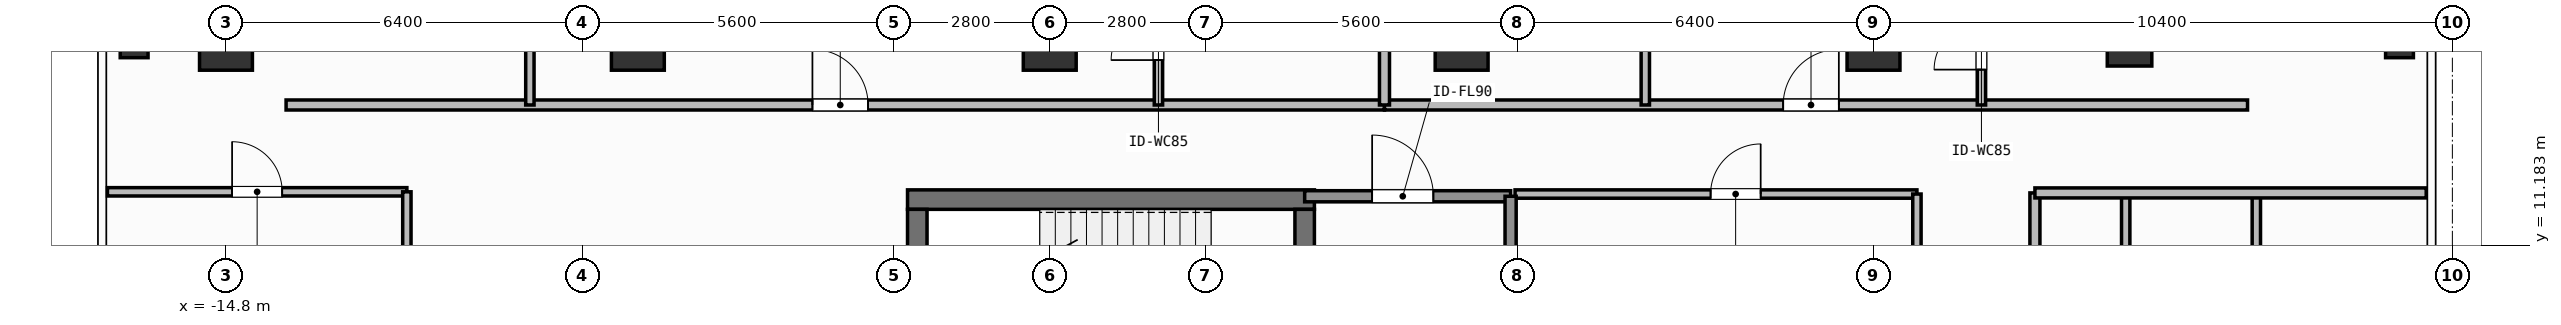
"""IFC4 building model, lengths in metres.
Left out: names, types, materials, properties, quantities, classifications, styles, units other than length and angle.
Written with IfcOpenShell. Run it as: python <this file> out.ifc"""

import sys

from ifc_helpers import new_model, si_unit, direction, frame, frame_2d, origin, origin_2d, place, context, subcontext, project, spatial, rectangle, hollow_rectangle, extrude, element, fill, save


model = new_model("IFC4")
c1 = context("Model", 3, precision=1e-05, world=origin(), true_north=direction((0.0, 1.0)))
c2 = subcontext(c1, "Body", "Model", "MODEL_VIEW")
j1 = project(units=[si_unit("LENGTHUNIT", "METRE"), si_unit("PLANEANGLEUNIT", "RADIAN")], contexts=[c1])
p1 = place(None, origin())
s1 = spatial("IfcSite", under=j1, at=p1, CompositionType="ELEMENT")
p2 = place(p1, origin())
s2 = spatial("IfcBuilding", under=s1, at=p2, CompositionType="ELEMENT")
p3 = place(p2, frame((0.0, 0.0, 278.1)))
s3 = spatial("IfcBuildingStorey", under=s2, at=p3, CompositionType="ELEMENT", Elevation=278.1)
p4 = place(p3, frame((-2.555, 12.0, 0.0), z_axis=(0.0, 0.0, 1.0), x_axis=(1.0, 0.0, 0.0)))
e1 = element("IfcWall", 1, at=p4, inside=s3, PredefinedType="SHEAR", context=c2, shape_type="SweptSolid", body=[
    extrude(rectangle(XDim=7.31, YDim=0.35, at=frame_2d((3.655, 0.0))), origin(), (0.0, 0.0, 1.0), 3.9),
])
p5 = place(p3, frame((-2.38, 8.9, 0.0), z_axis=(0.0, 0.0, 1.0), x_axis=(0.0, 1.0, 0.0)))
e2 = element("IfcWall", 2, at=p5, inside=s3, PredefinedType="SHEAR", context=c2, shape_type="SweptSolid", body=[
    extrude(rectangle(XDim=2.925, YDim=0.35, at=frame_2d((1.462, 0.0))), origin(), (0.0, 0.0, 1.0), 3.9),
])
p6 = place(p3, frame((4.58, 11.825, 0.0), z_axis=(0.0, 0.0, 1.0), x_axis=(0.0, -1.0, 0.0)))
e3 = element("IfcWall", 3, at=p6, inside=s3, PredefinedType="SHEAR", context=c2, shape_type="SweptSolid", body=[
    extrude(rectangle(XDim=2.925, YDim=0.35, at=frame_2d((1.462, 0.0))), origin(), (0.0, 0.0, 1.0), 3.9),
])
p7 = place(p6, frame((0.913, 0.0, 0.0)))
e4 = element("IfcOpeningElement", 4, at=p7, cuts=e3, PredefinedType="OPENING", context=c2, shape_type="SweptSolid", body=[
    extrude(rectangle(XDim=1.1, YDim=2.15, at=frame_2d((0.55, 1.075))), frame((0.0, 0.185, 0.0), z_axis=(0.0, -1.0, 0.0), x_axis=(1.0, 0.0, 0.0)), (0.0, 0.0, 1.0), 0.37),
])
for number, where, z_axis, x_axis in (
    (5, (-14.8, 14.8, 0.0), (0.0, 0.0, 1.0), (1.0, 0.0, 0.0)),
    (6, (-7.4, 14.8, 0.0), (0.0, 0.0, 1.0), (1.0, 0.0, 0.0)),
    (7, (0.0, 14.8, 0.0), (0.0, 0.0, 1.0), (1.0, 0.0, 0.0)),
    (8, (7.4, 14.8, 0.0), (0.0, 0.0, 1.0), (1.0, 0.0, 0.0)),
    (9, (14.8, 14.8, 0.0), (0.0, 0.0, 1.0), (1.0, 0.0, 0.0)),
):
    element("IfcColumn", number, at=place(p3, frame(where, z_axis=z_axis, x_axis=x_axis)), inside=s3, PredefinedType="COLUMN", context=c2, shape_type="SweptSolid", body=[
        extrude(rectangle(XDim=0.95, YDim=0.95, at=origin_2d()), origin(), (0.0, 0.0, 1.0), 3.9),
    ])
p8 = place(p3, frame((19.4, 14.8, 0.0), z_axis=(0.0, 0.0, 1.0), x_axis=(1.0, 0.0, 0.0)))
e10 = element("IfcColumn", 10, at=p8, inside=s3, PredefinedType="COLUMN", context=c2, shape_type="SweptSolid", body=[
    extrude(hollow_rectangle(XDim=0.8, YDim=0.8, WallThickness=0.036, at=origin_2d()), origin(), (0.0, 0.0, 1.0), 3.9),
])
for number, where, z_axis, x_axis in (
    (11, (-16.45, 14.8, 0.0), (0.0, 0.0, 1.0), (1.0, 0.0, 0.0)),
    (12, (24.25, 14.8, 0.0), (0.0, 0.0, 1.0), (1.0, 0.0, 0.0)),
):
    element("IfcColumn", number, at=place(p3, frame(where, z_axis=z_axis, x_axis=x_axis)), inside=s3, PredefinedType="COLUMN", context=c2, shape_type="SweptSolid", body=[
        extrude(hollow_rectangle(XDim=0.5, YDim=0.5, WallThickness=0.025, at=origin_2d()), origin(), (0.0, 0.0, 1.0), 3.9),
    ])
p9 = place(p3, frame((4.58, 12.06, 0.0), z_axis=(0.0, 0.0, 1.0), x_axis=(1.0, 0.0, 0.0)))
e13 = element("IfcWall", 13, at=p9, inside=s3, PredefinedType="SOLIDWALL", context=c2, shape_type="SweptSolid", body=[
    extrude(rectangle(XDim=3.7, YDim=0.2, at=frame_2d((1.85, 0.0))), origin(), (0.0, 0.0, 1.0), 3.68),
])
p10 = place(p9, frame((1.212, 0.0, 0.0)))
e14 = element("IfcOpeningElement", 14, at=p10, cuts=e13, PredefinedType="OPENING", context=c2, shape_type="SweptSolid", body=[
    extrude(rectangle(XDim=1.1, YDim=2.15, at=frame_2d((0.55, 1.075))), frame((0.0, 0.11, 0.0), z_axis=(0.0, -1.0, 0.0), x_axis=(1.0, 0.0, 0.0)), (0.0, 0.0, 1.0), 0.22),
])
p11 = place(p3, frame((8.36, 12.1, 0.0), z_axis=(0.0, 0.0, 1.0), x_axis=(1.0, 0.0, 0.0)))
e15 = element("IfcWall", 15, at=p11, inside=s3, PredefinedType="PARTITIONING", context=c2, shape_type="SweptSolid", body=[
    extrude(rectangle(XDim=7.22, YDim=0.15, at=frame_2d((3.61, 0.0))), origin(), (0.0, 0.0, 1.0), 3.68),
])
p12 = place(p11, frame((3.513, 0.0, 0.0)))
e16 = element("IfcOpeningElement", 16, at=p12, cuts=e15, PredefinedType="OPENING", context=c2, shape_type="SweptSolid", body=[
    extrude(rectangle(XDim=0.9, YDim=2.1, at=frame_2d((0.45, 1.05))), frame((0.0, 0.085, 0.0), z_axis=(0.0, -1.0, 0.0), x_axis=(1.0, 0.0, 0.0)), (0.0, 0.0, 1.0), 0.17),
])
p13 = place(p3, frame((-13.72, 13.7, 0.0), z_axis=(0.0, 0.0, 1.0), x_axis=(1.0, 0.0, 0.0)))
e17 = element("IfcWall", 17, at=p13, inside=s3, PredefinedType="PARTITIONING", context=c2, shape_type="SweptSolid", body=[
    extrude(rectangle(XDim=19.734, YDim=0.18, at=frame_2d((9.867, 0.0))), origin(), (0.0, 0.0, 1.0), 3.68),
])
p14 = place(p13, frame((9.456, 0.0, 0.0)))
e18 = element("IfcOpeningElement", 18, at=p14, cuts=e17, PredefinedType="OPENING", context=c2, shape_type="SweptSolid", body=[
    extrude(rectangle(XDim=1.0, YDim=2.2, at=frame_2d((0.5, 1.1))), frame((0.0, 0.1, 0.0), z_axis=(0.0, -1.0, 0.0), x_axis=(1.0, 0.0, 0.0)), (0.0, 0.0, 1.0), 0.2),
])
p15 = place(p3, frame((-9.34, 13.7, 0.0), z_axis=(0.0, 0.0, 1.0), x_axis=(0.0, 1.0, 0.0)))
e19 = element("IfcWall", 19, at=p15, inside=s3, PredefinedType="PARTITIONING", context=c2, shape_type="SweptSolid", body=[
    extrude(rectangle(XDim=4.11, YDim=0.15, at=frame_2d((2.055, 0.0))), origin(), (0.0, 0.0, 1.0), 3.68),
])
p16 = place(p15, frame((1.543, 0.0, 0.0)))
e20 = element("IfcOpeningElement", 20, at=p16, cuts=e19, PredefinedType="OPENING", context=c2, shape_type="SweptSolid", body=[
    extrude(rectangle(XDim=0.85, YDim=2.1, at=frame_2d((0.425, 1.05))), frame((0.0, 0.085, 0.0), z_axis=(0.0, -1.0, 0.0), x_axis=(1.0, 0.0, 0.0)), (0.0, 0.0, 1.0), 0.17),
])
p17 = place(p3, frame((1.953, 13.7, 0.0), z_axis=(0.0, 0.0, 1.0), x_axis=(0.0, 1.0, 0.0)))
e21 = element("IfcWall", 21, at=p17, inside=s3, PredefinedType="PARTITIONING", context=c2, shape_type="SweptSolid", body=[
    extrude(rectangle(XDim=2.302, YDim=0.15, at=frame_2d((1.151, 0.0))), origin(), (0.0, 0.0, 1.0), 3.68),
])
p18 = place(p17, frame((0.807, 0.0, 0.0)))
e22 = element("IfcOpeningElement", 22, at=p18, cuts=e21, PredefinedType="OPENING", context=c2, shape_type="SweptSolid", body=[
    extrude(rectangle(XDim=0.85, YDim=2.1, at=frame_2d((0.425, 1.05))), frame((0.0, 0.085, 0.0), z_axis=(0.0, -1.0, 0.0), x_axis=(1.0, 0.0, 0.0)), (0.0, 0.0, 1.0), 0.17),
])
p19 = place(p3, frame((6.014, 13.7, 0.0), z_axis=(0.0, 0.0, 1.0), x_axis=(1.0, 0.0, 0.0)))
e23 = element("IfcWall", 23, at=p19, inside=s3, PredefinedType="PARTITIONING", context=c2, shape_type="SweptSolid", body=[
    extrude(rectangle(XDim=15.506, YDim=0.18, at=frame_2d((7.753, 0.0))), origin(), (0.0, 0.0, 1.0), 3.68),
])
p20 = place(p19, frame((7.163, 0.0, 0.0)))
e24 = element("IfcOpeningElement", 24, at=p20, cuts=e23, PredefinedType="OPENING", context=c2, shape_type="SweptSolid", body=[
    extrude(rectangle(XDim=1.0, YDim=2.2, at=frame_2d((0.5, 1.1))), frame((0.0, 0.1, 0.0), z_axis=(0.0, -1.0, 0.0), x_axis=(1.0, 0.0, 0.0)), (0.0, 0.0, 1.0), 0.2),
])
p21 = place(p3, frame((10.7, 13.7, 0.0), z_axis=(0.0, 0.0, 1.0), x_axis=(0.0, 1.0, 0.0)))
e25 = element("IfcWall", 25, at=p21, inside=s3, PredefinedType="PARTITIONING", context=c2, shape_type="SweptSolid", body=[
    extrude(rectangle(XDim=3.787, YDim=0.15, at=frame_2d((1.894, 0.0))), origin(), (0.0, 0.0, 1.0), 3.68),
])
p22 = place(p21, frame((1.381, 0.0, 0.0)))
e26 = element("IfcOpeningElement", 26, at=p22, cuts=e25, PredefinedType="OPENING", context=c2, shape_type="SweptSolid", body=[
    extrude(rectangle(XDim=0.85, YDim=2.1, at=frame_2d((0.425, 1.05))), frame((0.0, 0.085, 0.0), z_axis=(0.0, -1.0, 0.0), x_axis=(1.0, 0.0, 0.0)), (0.0, 0.0, 1.0), 0.17),
])
p23 = place(p3, frame((16.739, 13.7, 0.0), z_axis=(0.0, 0.0, 1.0), x_axis=(0.0, 1.0, 0.0)))
e27 = element("IfcWall", 27, at=p23, inside=s3, PredefinedType="PARTITIONING", context=c2, shape_type="SweptSolid", body=[
    extrude(rectangle(XDim=2.121, YDim=0.15, at=frame_2d((1.061, 0.0))), origin(), (0.0, 0.0, 1.0), 3.68),
])
p24 = place(p23, frame((0.635, 0.0, 0.0)))
e28 = element("IfcOpeningElement", 28, at=p24, cuts=e27, PredefinedType="OPENING", context=c2, shape_type="SweptSolid", body=[
    extrude(rectangle(XDim=0.85, YDim=2.1, at=frame_2d((0.425, 1.05))), frame((0.0, 0.085, 0.0), z_axis=(0.0, -1.0, 0.0), x_axis=(1.0, 0.0, 0.0)), (0.0, 0.0, 1.0), 0.17),
])
p25 = place(p3, frame((-16.93, 12.14, 0.0), z_axis=(0.0, 0.0, 1.0), x_axis=(1.0, 0.0, 0.0)))
e29 = element("IfcWall", 29, at=p25, inside=s3, PredefinedType="PARTITIONING", context=c2, shape_type="SweptSolid", body=[
    extrude(rectangle(XDim=5.38, YDim=0.15, at=frame_2d((2.69, 0.0))), origin(), (0.0, 0.0, 1.0), 3.68),
])
p26 = place(p25, frame((2.24, 0.0, 0.0)))
e30 = element("IfcOpeningElement", 30, at=p26, cuts=e29, PredefinedType="OPENING", context=c2, shape_type="SweptSolid", body=[
    extrude(rectangle(XDim=0.9, YDim=2.1, at=frame_2d((0.45, 1.05))), frame((0.0, 0.085, 0.0), z_axis=(0.0, -1.0, 0.0), x_axis=(1.0, 0.0, 0.0)), (0.0, 0.0, 1.0), 0.17),
])
p27 = place(p3, frame((17.7, -12.12, 0.0), z_axis=(0.0, 0.0, 1.0), x_axis=(0.0, 1.0, 0.0)))
e31 = element("IfcWall", 31, at=p27, inside=s3, PredefinedType="PARTITIONING", context=c2, shape_type="SweptSolid", body=[
    extrude(rectangle(XDim=24.24, YDim=0.18, at=frame_2d((12.12, 0.0))), origin(), (0.0, 0.0, 1.0), 3.68),
])
p28 = place(p27, frame((11.62, 0.0, 0.0)))
e32 = element("IfcOpeningElement", 32, at=p28, cuts=e31, PredefinedType="OPENING", context=c2, shape_type="SweptSolid", body=[
    extrude(rectangle(XDim=1.0, YDim=2.2, at=frame_2d((0.5, 1.1))), frame((0.0, 0.1, 0.0), z_axis=(0.0, -1.0, 0.0), x_axis=(1.0, 0.0, 0.0)), (0.0, 0.0, 1.0), 0.2),
])
p29 = place(p3, frame((8.28, 8.725, 0.0), z_axis=(0.0, 0.0, 1.0), x_axis=(0.0, 1.0, 0.0)))
e33 = element("IfcWall", 33, at=p29, inside=s3, PredefinedType="SOLIDWALL", context=c2, shape_type="SweptSolid", body=[
    extrude(rectangle(XDim=3.335, YDim=0.2, at=frame_2d((1.667, 0.0))), origin(), (0.0, 0.0, 1.0), 3.68),
])
p30 = place(p3, frame((15.58, 5.85, 0.0), z_axis=(0.0, 0.0, 1.0), x_axis=(0.0, 1.0, 0.0)))
e34 = element("IfcWall", 34, at=p30, inside=s3, PredefinedType="PARTITIONING", context=c2, shape_type="SweptSolid", body=[
    extrude(rectangle(XDim=6.25, YDim=0.15, at=frame_2d((3.125, 0.0))), origin(), (0.0, 0.0, 1.0), 3.68),
])
p31 = place(p3, frame((6.014, 13.7, 0.0), z_axis=(0.0, 0.0, 1.0), x_axis=(0.0, 1.0, 0.0)))
e35 = element("IfcWall", 35, at=p31, inside=s3, PredefinedType="PARTITIONING", context=c2, shape_type="SweptSolid", body=[
    extrude(rectangle(XDim=7.33, YDim=0.18, at=frame_2d((3.665, 0.0))), origin(), (0.0, 0.0, 1.0), 3.68),
])
p32 = place(p3, frame((-11.55, 1.8, 0.0), z_axis=(0.0, 0.0, 1.0), x_axis=(0.0, 1.0, 0.0)))
e36 = element("IfcWall", 36, at=p32, inside=s3, PredefinedType="PARTITIONING", context=c2, shape_type="SweptSolid", body=[
    extrude(rectangle(XDim=10.34, YDim=0.15, at=frame_2d((5.17, 0.0))), origin(), (0.0, 0.0, 1.0), 3.68),
])
p33 = place(p3, frame((19.331, 5.431, 0.0), z_axis=(0.0, 0.0, 1.0), x_axis=(0.0, 1.0, 0.0)))
e37 = element("IfcWall", 37, at=p33, inside=s3, PredefinedType="PARTITIONING", context=c2, shape_type="SweptSolid", body=[
    extrude(rectangle(XDim=6.689, YDim=0.15, at=frame_2d((3.345, 0.0))), origin(), (0.0, 0.0, 1.0), 3.182),
])
p34 = place(p3, frame((21.678, 5.431, 0.0), z_axis=(0.0, 0.0, 1.0), x_axis=(0.0, 1.0, 0.0)))
e38 = element("IfcWall", 38, at=p34, inside=s3, PredefinedType="PARTITIONING", context=c2, shape_type="SweptSolid", body=[
    extrude(rectangle(XDim=6.689, YDim=0.15, at=frame_2d((3.345, 0.0))), origin(), (0.0, 0.0, 1.0), 3.68),
])
p35 = place(p3, frame((17.7, 12.12, 0.0), z_axis=(0.0, 0.0, 1.0), x_axis=(1.0, 0.0, 0.0)))
e39 = element("IfcWall", 39, at=p35, inside=s3, PredefinedType="PARTITIONING", context=c2, shape_type="SweptSolid", body=[
    extrude(rectangle(XDim=7.03, YDim=0.18, at=frame_2d((3.515, 0.0))), origin(), (0.0, 0.0, 1.0), 3.68),
])
p36 = place(p10, origin())
e40 = element("IfcDoor", 40, at=p36, inside=s3, OperationType="SINGLE_SWING_LEFT", PredefinedType="DOOR", context=c2, shape_type="SweptSolid", body=[
    extrude(rectangle(XDim=1.1, YDim=2.15, at=frame_2d((0.55, 1.075))), frame((0.0, 0.025, 0.0), z_axis=(0.0, -1.0, 0.0), x_axis=(1.0, 0.0, 0.0)), (0.0, 0.0, 1.0), 0.05),
])
fill(e14, e40)
p37 = place(p12, origin())
e41 = element("IfcDoor", 41, at=p37, inside=s3, OperationType="SINGLE_SWING_RIGHT", PredefinedType="DOOR", context=c2, shape_type="SweptSolid", body=[
    extrude(rectangle(XDim=0.9, YDim=2.1, at=frame_2d((0.45, 1.05))), frame((0.0, 0.025, 0.0), z_axis=(0.0, -1.0, 0.0), x_axis=(1.0, 0.0, 0.0)), (0.0, 0.0, 1.0), 0.05),
])
fill(e16, e41)
p38 = place(p14, origin())
e42 = element("IfcDoor", 42, at=p38, inside=s3, OperationType="SINGLE_SWING_LEFT", PredefinedType="DOOR", context=c2, shape_type="SweptSolid", body=[
    extrude(rectangle(XDim=1.0, YDim=2.2, at=frame_2d((0.5, 1.1))), frame((0.0, 0.025, 0.0), z_axis=(0.0, -1.0, 0.0), x_axis=(1.0, 0.0, 0.0)), (0.0, 0.0, 1.0), 0.05),
])
fill(e18, e42)
p39 = place(p18, origin())
e43 = element("IfcDoor", 43, at=p39, inside=s3, OperationType="SINGLE_SWING_LEFT", PredefinedType="DOOR", context=c2, shape_type="SweptSolid", body=[
    extrude(rectangle(XDim=0.85, YDim=2.1, at=frame_2d((0.425, 1.05))), frame((0.0, 0.025, 0.0), z_axis=(0.0, -1.0, 0.0), x_axis=(1.0, 0.0, 0.0)), (0.0, 0.0, 1.0), 0.05),
])
fill(e22, e43)
p40 = place(p20, origin())
e44 = element("IfcDoor", 44, at=p40, inside=s3, OperationType="SINGLE_SWING_RIGHT", PredefinedType="DOOR", context=c2, shape_type="SweptSolid", body=[
    extrude(rectangle(XDim=1.0, YDim=2.2, at=frame_2d((0.5, 1.1))), frame((0.0, 0.025, 0.0), z_axis=(0.0, -1.0, 0.0), x_axis=(1.0, 0.0, 0.0)), (0.0, 0.0, 1.0), 0.05),
])
fill(e24, e44)
p41 = place(p24, origin())
e45 = element("IfcDoor", 45, at=p41, inside=s3, OperationType="SINGLE_SWING_LEFT", PredefinedType="DOOR", context=c2, shape_type="SweptSolid", body=[
    extrude(rectangle(XDim=0.85, YDim=2.1, at=frame_2d((0.425, 1.05))), frame((0.0, 0.025, 0.0), z_axis=(0.0, -1.0, 0.0), x_axis=(1.0, 0.0, 0.0)), (0.0, 0.0, 1.0), 0.05),
])
fill(e28, e45)
p42 = place(p26, origin())
e46 = element("IfcDoor", 46, at=p42, inside=s3, OperationType="SINGLE_SWING_LEFT", PredefinedType="DOOR", context=c2, shape_type="SweptSolid", body=[
    extrude(rectangle(XDim=0.9, YDim=2.1, at=frame_2d((0.45, 1.05))), frame((0.0, 0.025, 0.0), z_axis=(0.0, -1.0, 0.0), x_axis=(1.0, 0.0, 0.0)), (0.0, 0.0, 1.0), 0.05),
])
fill(e30, e46)
save(model, sys.argv[1])
